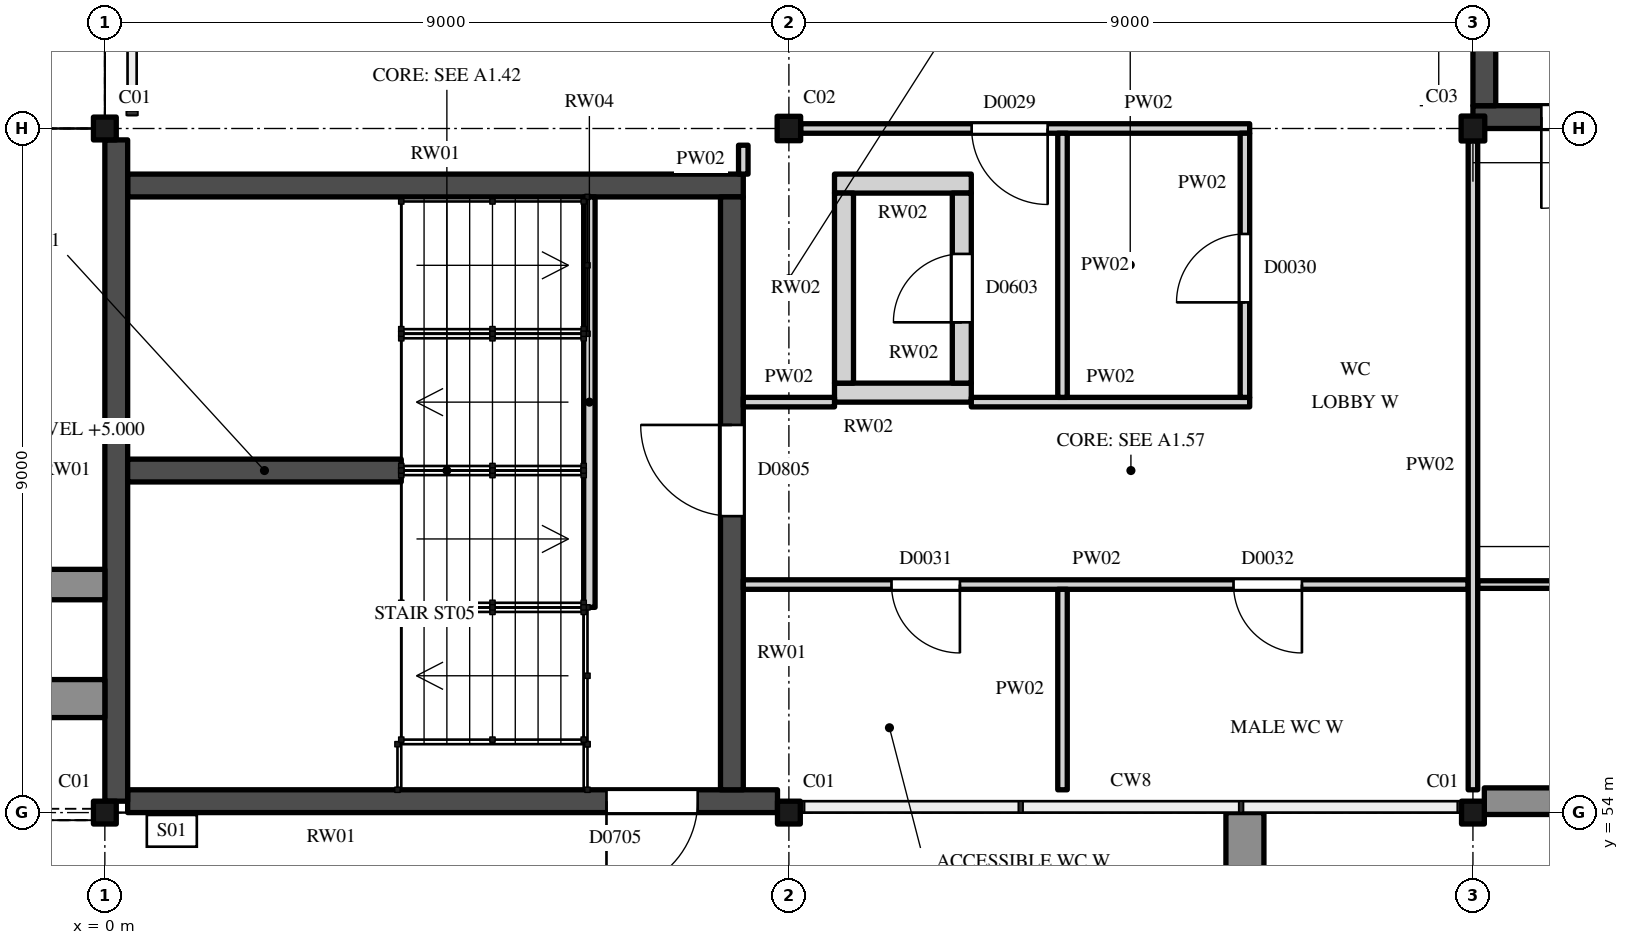
"""IFC4 building model, lengths in metres.
Left out: names, types, materials, properties, quantities, classifications, styles, units other than length and angle.
Written with IfcOpenShell. Run it as: python <this file> out.ifc"""

import sys

from ifc_helpers import new_model, si_unit, direction, frame, frame_2d, origin, origin_2d, place, context, subcontext, project, spatial, polyline, rectangle, hollow_rectangle, i_section, outline, extrude, element, fill, save


model = new_model("IFC4")
c1 = context("Model", 3, precision=1e-05, world=origin(), true_north=direction((0.0, 1.0)))
c2 = subcontext(c1, "Body", "Model", "MODEL_VIEW")
j1 = project(units=[si_unit("LENGTHUNIT", "METRE"), si_unit("PLANEANGLEUNIT", "RADIAN")], contexts=[c1])
p1 = place(None, origin())
s1 = spatial("IfcSite", under=j1, at=p1, CompositionType="ELEMENT")
p2 = place(p1, origin())
s2 = spatial("IfcBuilding", under=s1, at=p2, CompositionType="ELEMENT")
p3 = place(p2, origin())
s3 = spatial("IfcBuildingStorey", under=s2, at=p3, CompositionType="ELEMENT", Elevation=0.0)
for number, where, z_axis, x_axis in (
    (1, (0.0, 54.0, 0.0), (0.0, 0.0, 1.0), (1.0, 0.0, 0.0)),
    (2, (9.0, 54.0, 0.0), (0.0, 0.0, 1.0), (1.0, 0.0, 0.0)),
    (3, (18.0, 54.0, 0.0), (0.0, 0.0, 1.0), (1.0, 0.0, 0.0)),
    (4, (0.0, 63.0, 0.0), (0.0, 0.0, 1.0), (1.0, 0.0, 0.0)),
):
    element("IfcColumn", number, at=place(p3, frame(where, z_axis=z_axis, x_axis=x_axis)), inside=s3, PredefinedType="COLUMN", context=c2, shape_type="SweptSolid", body=[
        extrude(hollow_rectangle(XDim=0.3, YDim=0.3, WallThickness=0.012, InnerFilletRadius=0.019, OuterFilletRadius=0.031, at=origin_2d()), origin(), (0.0, 0.0, 1.0), 6.0),
    ])
p4 = place(p3, frame((9.0, 63.0, 0.0), z_axis=(0.0, 0.0, 1.0), x_axis=(1.0, 0.0, 0.0)))
e5 = element("IfcColumn", 5, at=p4, inside=s3, PredefinedType="COLUMN", context=c2, shape_type="SweptSolid", body=[
    extrude(i_section(OverallWidth=0.309, OverallDepth=0.321, WebThickness=0.014, FlangeThickness=0.022, FilletRadius=0.017, at=origin_2d()), origin(), (0.0, 0.0, 1.0), 6.0),
])
p5 = place(p3, frame((18.0, 63.0, 0.0), z_axis=(0.0, 0.0, 1.0), x_axis=(1.0, 0.0, 0.0)))
e6 = element("IfcColumn", 6, at=p5, inside=s3, PredefinedType="COLUMN", context=c2, shape_type="SweptSolid", body=[
    extrude(i_section(OverallWidth=0.311, OverallDepth=0.327, WebThickness=0.016, FlangeThickness=0.025, FilletRadius=0.017, at=origin_2d()), origin(), (0.0, 0.0, 1.0), 6.0),
])
p6 = place(p3, frame((0.0, 53.975, 5.0), z_axis=(0.0, 0.0, 1.0), x_axis=(-1.0, 0.0, 0.0)))
e7 = element("IfcWall", 7, at=p6, inside=s3, PredefinedType="PARAPET", context=c2, shape_type="SweptSolid", body=[
    extrude(rectangle(XDim=4.35, YDim=0.15, at=frame_2d((2.175, 0.0))), origin(), (0.0, 0.0, 1.0), 0.3),
])
p7 = place(p3, frame((0.3, 54.15, 0.0), z_axis=(0.0, 0.0, 1.0), x_axis=(1.0, 0.0, 0.0)))
e8 = element("IfcWall", 8, at=p7, inside=s3, PredefinedType="SHEAR", context=c2, shape_type="SweptSolid", body=[
    extrude(rectangle(XDim=8.55, YDim=0.3, at=frame_2d((4.275, 0.0))), origin(), (0.0, 0.0, 1.0), 6.0),
])
p8 = place(p7, frame((6.3, 0.0, 0.0)))
e9 = element("IfcOpeningElement", 9, at=p8, cuts=e8, PredefinedType="OPENING", context=c2, shape_type="SweptSolid", body=[
    extrude(rectangle(XDim=1.2, YDim=2.1, at=frame_2d((0.6, 1.05))), frame((0.0, 0.16, 0.0), z_axis=(0.0, -1.0, 0.0), x_axis=(1.0, 0.0, 0.0)), (0.0, 0.0, 1.0), 0.32),
])
p9 = place(p3, frame((0.3, 62.25, 0.0), z_axis=(0.0, 0.0, 1.0), x_axis=(1.0, 0.0, 0.0)))
e10 = element("IfcWall", 10, at=p9, inside=s3, PredefinedType="SHEAR", context=c2, shape_type="SweptSolid", body=[
    extrude(rectangle(XDim=8.1, YDim=0.3, at=frame_2d((4.05, 0.0))), origin(), (0.0, 0.0, 1.0), 6.0),
])
p10 = place(p3, frame((0.15, 54.15, 0.0), z_axis=(0.0, 0.0, 1.0), x_axis=(0.0, 1.0, 0.0)))
e11 = element("IfcWall", 11, at=p10, inside=s3, PredefinedType="SHEAR", context=c2, shape_type="SweptSolid", body=[
    extrude(rectangle(XDim=8.7, YDim=0.3, at=frame_2d((4.35, 0.0))), origin(), (0.0, 0.0, 1.0), 6.0),
])
p11 = place(p3, frame((8.25, 54.3, 0.0), z_axis=(0.0, 0.0, 1.0), x_axis=(0.0, 1.0, 0.0)))
e12 = element("IfcWall", 12, at=p11, inside=s3, PredefinedType="SHEAR", context=c2, shape_type="SweptSolid", body=[
    extrude(rectangle(XDim=7.8, YDim=0.3, at=frame_2d((3.9, 0.0))), origin(), (0.0, 0.0, 1.0), 6.0),
])
p12 = place(p11, frame((3.6, 0.0, 0.0)))
e13 = element("IfcOpeningElement", 13, at=p12, cuts=e12, PredefinedType="OPENING", context=c2, shape_type="SweptSolid", body=[
    extrude(rectangle(XDim=1.2, YDim=2.1, at=frame_2d((0.6, 1.05))), frame((0.0, 0.16, 0.0), z_axis=(0.0, -1.0, 0.0), x_axis=(1.0, 0.0, 0.0)), (0.0, 0.0, 1.0), 0.32),
])
p13 = place(p3, frame((3.9, 58.5, 0.0), z_axis=(0.0, 0.0, 1.0), x_axis=(-1.0, 0.0, 0.0)))
e14 = element("IfcWall", 14, at=p13, inside=s3, PredefinedType="SHEAR", context=c2, shape_type="SweptSolid", body=[
    extrude(rectangle(XDim=3.6, YDim=0.3, at=frame_2d((1.8, 0.0))), origin(), (0.0, 0.0, 1.0), 6.0),
])
p14 = place(p3, frame((6.375, 56.7, 0.0), z_axis=(0.0, 0.0, 1.0), x_axis=(0.0, 1.0, 0.0)))
e15 = element("IfcWall", 15, at=p14, inside=s3, PredefinedType="STANDARD", context=c2, shape_type="SweptSolid", body=[
    extrude(rectangle(XDim=5.4, YDim=0.15, at=frame_2d((2.7, 0.0))), origin(), (0.0, 0.0, 1.0), 2.8),
])
for number, where, z_axis, x_axis in (
    (16, (9.6, 59.525, 0.0), (0.0, 0.0, 1.0), (1.0, 0.0, 0.0)),
    (17, (9.6, 62.275, 0.0), (0.0, 0.0, 1.0), (1.0, 0.0, 0.0)),
):
    element("IfcWall", number, at=place(p3, frame(where, z_axis=z_axis, x_axis=x_axis)), inside=s3, PredefinedType="STANDARD", context=c2, shape_type="SweptSolid", body=[
        extrude(rectangle(XDim=1.8, YDim=0.25, at=frame_2d((0.9, 0.0))), origin(), (0.0, 0.0, 1.0), 6.0),
    ])
p15 = place(p3, frame((9.725, 59.65, 0.0), z_axis=(0.0, 0.0, 1.0), x_axis=(0.0, 1.0, 0.0)))
e18 = element("IfcWall", 18, at=p15, inside=s3, PredefinedType="STANDARD", context=c2, shape_type="SweptSolid", body=[
    extrude(rectangle(XDim=2.5, YDim=0.25, at=frame_2d((1.25, 0.0))), origin(), (0.0, 0.0, 1.0), 6.0),
])
p16 = place(p3, frame((11.275, 59.65, 0.0), z_axis=(0.0, 0.0, 1.0), x_axis=(0.0, 1.0, 0.0)))
e19 = element("IfcWall", 19, at=p16, inside=s3, PredefinedType="STANDARD", context=c2, shape_type="SweptSolid", body=[
    extrude(rectangle(XDim=2.5, YDim=0.25, at=frame_2d((1.25, 0.0))), origin(), (0.0, 0.0, 1.0), 6.0),
])
p17 = place(p16, frame((0.8, 0.0, 0.0)))
e20 = element("IfcOpeningElement", 20, at=p17, cuts=e19, PredefinedType="OPENING", context=c2, shape_type="SweptSolid", body=[
    extrude(rectangle(XDim=0.9, YDim=2.1, at=frame_2d((0.45, 1.05))), frame((0.0, 0.135, 0.0), z_axis=(0.0, -1.0, 0.0), x_axis=(1.0, 0.0, 0.0)), (0.0, 0.0, 1.0), 0.27),
])
p18 = place(p3, frame((18.0, 63.15, 0.0), z_axis=(0.0, 0.0, 1.0), x_axis=(1.0, 0.0, 0.0)))
e21 = element("IfcWall", 21, at=p18, inside=s3, PredefinedType="SHEAR", context=c2, shape_type="SweptSolid", body=[
    extrude(rectangle(XDim=9.0, YDim=0.3, at=frame_2d((4.5, 0.0))), origin(), (0.0, 0.0, 1.0), 6.0),
])
p19 = place(p18, frame((7.0, 0.0, 0.0)))
e22 = element("IfcOpeningElement", 22, at=p19, cuts=e21, PredefinedType="OPENING", context=c2, shape_type="SweptSolid", body=[
    extrude(rectangle(XDim=1.8, YDim=2.4, at=frame_2d((0.9, 1.2))), frame((0.0, 0.16, 0.0), z_axis=(0.0, -1.0, 0.0), x_axis=(1.0, 0.0, 0.0)), (0.0, 0.0, 1.0), 0.32),
])
p20 = place(p18, frame((0.9, 0.0, 0.0)))
e23 = element("IfcOpeningElement", 23, at=p20, cuts=e21, PredefinedType="OPENING", context=c2, shape_type="SweptSolid", body=[
    extrude(rectangle(XDim=1.2, YDim=2.1, at=frame_2d((0.6, 1.05))), frame((0.0, 0.16, 0.0), z_axis=(0.0, -1.0, 0.0), x_axis=(1.0, 0.0, 0.0)), (0.0, 0.0, 1.0), 0.32),
])
p21 = place(p3, frame((18.15, 63.3, 0.0), z_axis=(0.0, 0.0, 1.0), x_axis=(0.0, 1.0, 0.0)))
e24 = element("IfcWall", 24, at=p21, inside=s3, PredefinedType="SHEAR", context=c2, shape_type="SweptSolid", body=[
    extrude(rectangle(XDim=8.7, YDim=0.3, at=frame_2d((4.35, 0.0))), origin(), (0.0, 0.0, 1.0), 6.0),
])
p22 = place(p3, frame((18.15, 54.15, 0.0), z_axis=(0.0, 0.0, 1.0), x_axis=(1.0, 0.0, 0.0)))
e25 = element("IfcWall", 25, at=p22, inside=s3, PredefinedType="SOLIDWALL", context=c2, shape_type="SweptSolid", body=[
    extrude(rectangle(XDim=8.689, YDim=0.35, at=frame_2d((4.345, 0.0))), origin(), (0.0, 0.0, 1.0), 5.469),
])
p23 = place(p3, frame((0.0, 55.5, 0.0), z_axis=(0.0, 0.0, 1.0), x_axis=(-1.0, 0.0, 0.0)))
e26 = element("IfcWall", 26, at=p23, inside=s3, PredefinedType="SOLIDWALL", context=c2, shape_type="SweptSolid", body=[
    extrude(outline(polyline([(0.0, 0.0), (3.6, 0.0), (3.6, 1.2), (0.0, 24.0), (0.0, 0.0)])), frame((0.0, 0.25, 0.0), z_axis=(0.0, -1.0, 0.0), x_axis=(1.0, 0.0, 0.0)), (0.0, 0.0, 1.0), 0.5),
])
p24 = place(p3, frame((0.0, 57.0, 0.0), z_axis=(0.0, 0.0, 1.0), x_axis=(-1.0, 0.0, 0.0)))
e27 = element("IfcWall", 27, at=p24, inside=s3, PredefinedType="SOLIDWALL", context=c2, shape_type="SweptSolid", body=[
    extrude(outline(polyline([(0.0, 0.0), (2.4, 0.0), (2.4, 1.2), (0.0, 17.0), (0.0, 0.0)])), frame((0.0, 0.2, 0.0), z_axis=(0.0, -1.0, 0.0), x_axis=(1.0, 0.0, 0.0)), (0.0, 0.0, 1.0), 0.4),
])
p25 = place(p3, frame((15.0, 54.0, 0.0), z_axis=(0.0, 0.0, 1.0), x_axis=(0.0, -1.0, 0.0)))
e28 = element("IfcWall", 28, at=p25, inside=s3, PredefinedType="SOLIDWALL", context=c2, shape_type="SweptSolid", body=[
    extrude(outline(polyline([(0.0, 0.0), (3.0, 0.0), (3.0, 1.2), (0.0, 9.0), (0.0, 0.0)])), frame((0.0, 0.25, 0.0), z_axis=(0.0, -1.0, 0.0), x_axis=(1.0, 0.0, 0.0)), (0.0, 0.0, 1.0), 0.5),
])
p26 = place(p3, frame((8.4, 57.0, 0.0), z_axis=(0.0, 0.0, 1.0), x_axis=(1.0, 0.0, 0.0)))
e29 = element("IfcWall", 29, at=p26, inside=s3, PredefinedType="PARTITIONING", context=c2, shape_type="SweptSolid", body=[
    extrude(rectangle(XDim=9.538, YDim=0.125, at=frame_2d((4.769, 0.0))), origin(), (0.0, 0.0, 1.0), 5.469),
])
p27 = place(p26, frame((1.95, 0.0, 0.0)))
e30 = element("IfcOpeningElement", 30, at=p27, cuts=e29, PredefinedType="OPENING", context=c2, shape_type="SweptSolid", body=[
    extrude(rectangle(XDim=0.9, YDim=2.1, at=frame_2d((0.45, 1.05))), frame((0.0, 0.073, 0.0), z_axis=(0.0, -1.0, 0.0), x_axis=(1.0, 0.0, 0.0)), (0.0, 0.0, 1.0), 0.145),
])
p28 = place(p26, frame((6.45, 0.0, 0.0)))
e31 = element("IfcOpeningElement", 31, at=p28, cuts=e29, PredefinedType="OPENING", context=c2, shape_type="SweptSolid", body=[
    extrude(rectangle(XDim=0.9, YDim=2.1, at=frame_2d((0.45, 1.05))), frame((0.0, 0.073, 0.0), z_axis=(0.0, -1.0, 0.0), x_axis=(1.0, 0.0, 0.0)), (0.0, 0.0, 1.0), 0.145),
])
p29 = place(p3, frame((18.062, 57.0, 0.0), z_axis=(0.0, 0.0, 1.0), x_axis=(1.0, 0.0, 0.0)))
e32 = element("IfcWall", 32, at=p29, inside=s3, PredefinedType="PARTITIONING", context=c2, shape_type="SweptSolid", body=[
    extrude(rectangle(XDim=26.988, YDim=0.1, at=frame_2d((13.494, 0.0))), origin(), (0.0, 0.0, 1.0), 5.469),
])
p30 = place(p29, frame((3.95, 0.0, 0.0)))
e33 = element("IfcOpeningElement", 33, at=p30, cuts=e32, PredefinedType="OPENING", context=c2, shape_type="SweptSolid", body=[
    extrude(rectangle(XDim=1.0, YDim=2.1, at=frame_2d((0.5, 1.05))), frame((0.0, 0.06, 0.0), z_axis=(0.0, -1.0, 0.0), x_axis=(1.0, 0.0, 0.0)), (0.0, 0.0, 1.0), 0.12),
])
p31 = place(p29, frame((11.488, 0.0, 0.0)))
e34 = element("IfcOpeningElement", 34, at=p31, cuts=e32, PredefinedType="OPENING", context=c2, shape_type="SweptSolid", body=[
    extrude(rectangle(XDim=0.9, YDim=2.1, at=frame_2d((0.45, 1.05))), frame((0.0, 0.06, 0.0), z_axis=(0.0, -1.0, 0.0), x_axis=(1.0, 0.0, 0.0)), (0.0, 0.0, 1.0), 0.12),
])
p32 = place(p29, frame((20.188, 0.0, 0.0)))
e35 = element("IfcOpeningElement", 35, at=p32, cuts=e32, PredefinedType="OPENING", context=c2, shape_type="SweptSolid", body=[
    extrude(rectangle(XDim=1.5, YDim=2.4, at=frame_2d((0.75, 1.2))), frame((0.0, 0.06, 0.0), z_axis=(0.0, -1.0, 0.0), x_axis=(1.0, 0.0, 0.0)), (0.0, 0.0, 1.0), 0.12),
])
p33 = place(p3, frame((8.4, 59.4, 0.0), z_axis=(0.0, 0.0, 1.0), x_axis=(1.0, 0.0, 0.0)))
e36 = element("IfcWall", 36, at=p33, inside=s3, PredefinedType="PARTITIONING", context=c2, shape_type="SweptSolid", body=[
    extrude(rectangle(XDim=1.2, YDim=0.125, at=frame_2d((0.6, 0.0))), origin(), (0.0, 0.0, 1.0), 5.825),
])
p34 = place(p3, frame((11.4, 59.4, 0.0), z_axis=(0.0, 0.0, 1.0), x_axis=(1.0, 0.0, 0.0)))
e37 = element("IfcWall", 37, at=p34, inside=s3, PredefinedType="PARTITIONING", context=c2, shape_type="SweptSolid", body=[
    extrude(rectangle(XDim=3.663, YDim=0.125, at=frame_2d((1.831, 0.0))), origin(), (0.0, 0.0, 1.0), 5.825),
])
p35 = place(p3, frame((9.155, 63.0, 0.0), z_axis=(0.0, 0.0, 1.0), x_axis=(1.0, 0.0, 0.0)))
e38 = element("IfcWall", 38, at=p35, inside=s3, PredefinedType="PARTITIONING", context=c2, shape_type="SweptSolid", body=[
    extrude(rectangle(XDim=5.908, YDim=0.125, at=frame_2d((2.954, 0.0))), origin(), (0.0, 0.0, 1.0), 5.469),
])
p36 = place(p35, frame((2.25, 0.0, 0.0)))
e39 = element("IfcOpeningElement", 39, at=p36, cuts=e38, PredefinedType="OPENING", context=c2, shape_type="SweptSolid", body=[
    extrude(rectangle(XDim=1.0, YDim=2.1, at=frame_2d((0.5, 1.05))), frame((0.0, 0.073, 0.0), z_axis=(0.0, -1.0, 0.0), x_axis=(1.0, 0.0, 0.0)), (0.0, 0.0, 1.0), 0.145),
])
p37 = place(p3, frame((8.4, 62.4, 0.0), z_axis=(0.0, 0.0, 1.0), x_axis=(0.0, 1.0, 0.0)))
e40 = element("IfcWall", 40, at=p37, inside=s3, PredefinedType="PARTITIONING", context=c2, shape_type="SweptSolid", body=[
    extrude(rectangle(XDim=0.38, YDim=0.125, at=frame_2d((0.19, 0.0))), origin(), (0.0, 0.0, 1.0), 5.825),
])
p38 = place(p3, frame((12.6, 54.3, 0.0), z_axis=(0.0, 0.0, 1.0), x_axis=(0.0, 1.0, 0.0)))
e41 = element("IfcWall", 41, at=p38, inside=s3, PredefinedType="PARTITIONING", context=c2, shape_type="SweptSolid", body=[
    extrude(rectangle(XDim=2.637, YDim=0.125, at=frame_2d((1.319, 0.0))), origin(), (0.0, 0.0, 1.0), 5.825),
])
p39 = place(p3, frame((12.6, 59.462, 0.0), z_axis=(0.0, 0.0, 1.0), x_axis=(0.0, 1.0, 0.0)))
e42 = element("IfcWall", 42, at=p39, inside=s3, PredefinedType="PARTITIONING", context=c2, shape_type="SweptSolid", body=[
    extrude(rectangle(XDim=3.475, YDim=0.125, at=frame_2d((1.738, 0.0))), origin(), (0.0, 0.0, 1.0), 5.825),
])
p40 = place(p3, frame((15.0, 59.462, 0.0), z_axis=(0.0, 0.0, 1.0), x_axis=(0.0, 1.0, 0.0)))
e43 = element("IfcWall", 43, at=p40, inside=s3, PredefinedType="PARTITIONING", context=c2, shape_type="SweptSolid", body=[
    extrude(rectangle(XDim=3.475, YDim=0.125, at=frame_2d((1.738, 0.0))), origin(), (0.0, 0.0, 1.0), 5.825),
])
p41 = place(p40, frame((1.25, 0.0, 0.0)))
e44 = element("IfcOpeningElement", 44, at=p41, cuts=e43, PredefinedType="OPENING", context=c2, shape_type="SweptSolid", body=[
    extrude(rectangle(XDim=0.9, YDim=2.1, at=frame_2d((0.45, 1.05))), frame((0.0, 0.073, 0.0), z_axis=(0.0, -1.0, 0.0), x_axis=(1.0, 0.0, 0.0)), (0.0, 0.0, 1.0), 0.145),
])
p42 = place(p3, frame((18.0, 54.3, 0.0), z_axis=(0.0, 0.0, 1.0), x_axis=(0.0, 1.0, 0.0)))
e45 = element("IfcWall", 45, at=p42, inside=s3, PredefinedType="PARTITIONING", context=c2, shape_type="SweptSolid", body=[
    extrude(rectangle(XDim=8.536, YDim=0.125, at=frame_2d((4.268, 0.0))), origin(), (0.0, 0.0, 1.0), 5.365),
])
p43 = place(p12, origin())
e46 = element("IfcDoor", 46, at=p43, inside=s3, OperationType="SINGLE_SWING_LEFT", PredefinedType="DOOR", context=c2, shape_type="SweptSolid", body=[
    extrude(rectangle(XDim=1.2, YDim=2.1, at=frame_2d((0.6, 1.05))), frame((0.0, 0.025, 0.0), z_axis=(0.0, -1.0, 0.0), x_axis=(1.0, 0.0, 0.0)), (0.0, 0.0, 1.0), 0.05),
])
fill(e13, e46)
p44 = place(p8, frame((1.2, 0.0, 0.0), z_axis=(0.0, 0.0, 1.0), x_axis=(-1.0, 0.0, 0.0)))
e47 = element("IfcDoor", 47, at=p44, inside=s3, OperationType="SINGLE_SWING_LEFT", PredefinedType="DOOR", context=c2, shape_type="SweptSolid", body=[
    extrude(rectangle(XDim=1.2, YDim=2.1, at=frame_2d((0.6, 1.05))), frame((0.0, 0.025, 0.0), z_axis=(0.0, -1.0, 0.0), x_axis=(1.0, 0.0, 0.0)), (0.0, 0.0, 1.0), 0.05),
])
fill(e9, e47)
p45 = place(p17, origin())
e48 = element("IfcDoor", 48, at=p45, inside=s3, OperationType="SINGLE_SWING_RIGHT", PredefinedType="DOOR", context=c2, shape_type="SweptSolid", body=[
    extrude(rectangle(XDim=0.9, YDim=2.1, at=frame_2d((0.45, 1.05))), frame((0.0, 0.025, 0.0), z_axis=(0.0, -1.0, 0.0), x_axis=(1.0, 0.0, 0.0)), (0.0, 0.0, 1.0), 0.05),
])
fill(e20, e48)
p46 = place(p20, origin())
e49 = element("IfcDoor", 49, at=p46, inside=s3, OperationType="SINGLE_SWING_LEFT", PredefinedType="DOOR", context=c2, shape_type="SweptSolid", body=[
    extrude(rectangle(XDim=1.2, YDim=2.1, at=frame_2d((0.6, 1.05))), frame((0.0, 0.025, 0.0), z_axis=(0.0, -1.0, 0.0), x_axis=(1.0, 0.0, 0.0)), (0.0, 0.0, 1.0), 0.05),
])
fill(e23, e49)
p47 = place(p36, origin())
e50 = element("IfcDoor", 50, at=p47, inside=s3, OperationType="SINGLE_SWING_RIGHT", PredefinedType="DOOR", context=c2, shape_type="SweptSolid", body=[
    extrude(rectangle(XDim=1.0, YDim=2.1, at=frame_2d((0.5, 1.05))), frame((0.0, 0.025, 0.0), z_axis=(0.0, -1.0, 0.0), x_axis=(1.0, 0.0, 0.0)), (0.0, 0.0, 1.0), 0.05),
])
fill(e39, e50)
p48 = place(p41, origin())
e51 = element("IfcDoor", 51, at=p48, inside=s3, OperationType="SINGLE_SWING_RIGHT", PredefinedType="DOOR", context=c2, shape_type="SweptSolid", body=[
    extrude(rectangle(XDim=0.9, YDim=2.1, at=frame_2d((0.45, 1.05))), frame((0.0, 0.025, 0.0), z_axis=(0.0, -1.0, 0.0), x_axis=(1.0, 0.0, 0.0)), (0.0, 0.0, 1.0), 0.05),
])
fill(e44, e51)
p49 = place(p27, origin())
e52 = element("IfcDoor", 52, at=p49, inside=s3, OperationType="SINGLE_SWING_RIGHT", PredefinedType="DOOR", context=c2, shape_type="SweptSolid", body=[
    extrude(rectangle(XDim=0.9, YDim=2.1, at=frame_2d((0.45, 1.05))), frame((0.0, 0.025, 0.0), z_axis=(0.0, -1.0, 0.0), x_axis=(1.0, 0.0, 0.0)), (0.0, 0.0, 1.0), 0.05),
])
fill(e30, e52)
p50 = place(p28, origin())
e53 = element("IfcDoor", 53, at=p50, inside=s3, OperationType="SINGLE_SWING_RIGHT", PredefinedType="DOOR", context=c2, shape_type="SweptSolid", body=[
    extrude(rectangle(XDim=0.9, YDim=2.1, at=frame_2d((0.45, 1.05))), frame((0.0, 0.025, 0.0), z_axis=(0.0, -1.0, 0.0), x_axis=(1.0, 0.0, 0.0)), (0.0, 0.0, 1.0), 0.05),
])
fill(e31, e53)
save(model, sys.argv[1])
